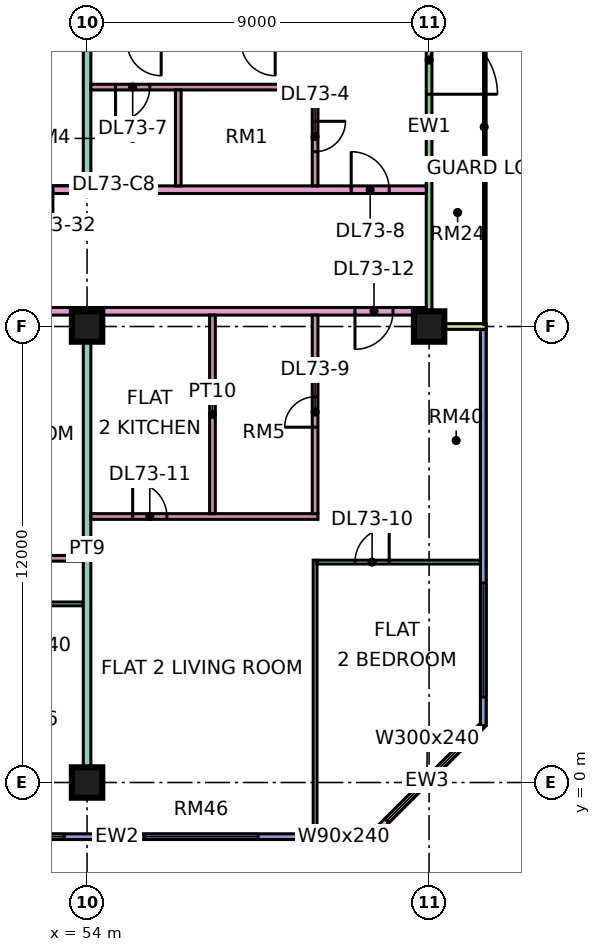
"""IFC4 building model, lengths in metres.
Left out: names, types, materials, properties, quantities, classifications, styles, units other than length and angle.
Written with IfcOpenShell. Run it as: python <this file> out.ifc"""

import sys

from ifc_helpers import new_model, si_unit, direction, frame, frame_2d, origin, origin_2d, place, context, subcontext, project, spatial, rectangle, extrude, element, fill, save


model = new_model("IFC4")
c1 = context("Model", 3, precision=1e-05, world=origin(), true_north=direction((0.0, 1.0)))
c2 = subcontext(c1, "Body", "Model", "MODEL_VIEW")
j1 = project(units=[si_unit("LENGTHUNIT", "METRE"), si_unit("PLANEANGLEUNIT", "RADIAN")], contexts=[c1])
p1 = place(None, origin())
s1 = spatial("IfcSite", under=j1, at=p1, CompositionType="ELEMENT")
p2 = place(p1, origin())
s2 = spatial("IfcBuilding", under=s1, at=p2, CompositionType="ELEMENT")
p3 = place(p2, frame((0.0, 0.0, 310.9)))
s3 = spatial("IfcBuildingStorey", under=s2, at=p3, CompositionType="ELEMENT", Elevation=310.9)
for number, where, z_axis, x_axis in (
    (1, (54.0, 0.0, 0.0), (0.0, 0.0, 1.0), (1.0, 0.0, 0.0)),
    (2, (54.0, 12.0, 0.0), (0.0, 0.0, 1.0), (1.0, 0.0, 0.0)),
    (3, (63.0, 12.0, 0.0), (0.0, 0.0, 1.0), (1.0, 0.0, 0.0)),
):
    element("IfcColumn", number, at=place(p3, frame(where, z_axis=z_axis, x_axis=x_axis)), inside=s3, PredefinedType="COLUMN", context=c2, shape_type="SweptSolid", body=[
        extrude(rectangle(XDim=0.8, YDim=0.8, at=origin_2d()), origin(), (0.0, 0.0, 1.0), 3.75),
    ])
p4 = place(p3, frame((48.075, -1.425, 0.0), z_axis=(0.0, 0.0, 1.0), x_axis=(1.0, 0.0, 0.0)))
e4 = element("IfcWall", 4, at=p4, inside=s3, PredefinedType="SOLIDWALL", context=c2, shape_type="SweptSolid", body=[
    extrude(rectangle(XDim=13.425, YDim=0.15, at=frame_2d((6.712, 0.0))), origin(), (0.0, 0.0, 1.0), 3.35),
])
p5 = place(p4, frame((0.562, 0.0, 0.45)))
e5 = element("IfcOpeningElement", 5, at=p5, cuts=e4, PredefinedType="OPENING", context=c2, shape_type="SweptSolid", body=[
    extrude(rectangle(XDim=1.8, YDim=2.4, at=frame_2d((0.9, 1.2))), frame((0.0, 0.085, 0.0), z_axis=(0.0, -1.0, 0.0), x_axis=(1.0, 0.0, 0.0)), (0.0, 0.0, 1.0), 0.17),
])
p6 = place(p4, frame((3.525, 0.0, 0.45)))
e6 = element("IfcOpeningElement", 6, at=p6, cuts=e4, PredefinedType="OPENING", context=c2, shape_type="SweptSolid", body=[
    extrude(rectangle(XDim=1.8, YDim=2.4, at=frame_2d((0.9, 1.2))), frame((0.0, 0.085, 0.0), z_axis=(0.0, -1.0, 0.0), x_axis=(1.0, 0.0, 0.0)), (0.0, 0.0, 1.0), 0.17),
])
p7 = place(p4, frame((7.425, 0.0, 0.45)))
e7 = element("IfcOpeningElement", 7, at=p7, cuts=e4, PredefinedType="OPENING", context=c2, shape_type="SweptSolid", body=[
    extrude(rectangle(XDim=3.0, YDim=2.4, at=frame_2d((1.5, 1.2))), frame((0.0, 0.085, 0.0), z_axis=(0.0, -1.0, 0.0), x_axis=(1.0, 0.0, 0.0)), (0.0, 0.0, 1.0), 0.17),
])
p8 = place(p4, frame((12.225, 0.0, 0.45)))
e8 = element("IfcOpeningElement", 8, at=p8, cuts=e4, PredefinedType="OPENING", context=c2, shape_type="SweptSolid", body=[
    extrude(rectangle(XDim=0.9, YDim=2.4, at=frame_2d((0.45, 1.2))), frame((0.0, 0.085, 0.0), z_axis=(0.0, -1.0, 0.0), x_axis=(1.0, 0.0, 0.0)), (0.0, 0.0, 1.0), 0.17),
])
p9 = place(p3, frame((61.447, -1.447, 0.0), z_axis=(0.0, 0.0, 1.0), x_axis=(0.707106781187, 0.707106781187, 0.0)))
e9 = element("IfcWall", 9, at=p9, inside=s3, PredefinedType="SOLIDWALL", context=c2, shape_type="SweptSolid", body=[
    extrude(rectangle(XDim=4.243, YDim=0.15, at=frame_2d((2.121, 0.0))), origin(), (0.0, 0.0, 1.0), 3.35),
])
p10 = place(p9, frame((0.621, 0.0, 0.45)))
e10 = element("IfcOpeningElement", 10, at=p10, cuts=e9, PredefinedType="OPENING", context=c2, shape_type="SweptSolid", body=[
    extrude(rectangle(XDim=3.0, YDim=2.4, at=frame_2d((1.5, 1.2))), frame((0.0, 0.085, 0.0), z_axis=(0.0, -1.0, 0.0), x_axis=(1.0, 0.0, 0.0)), (0.0, 0.0, 1.0), 0.17),
])
p11 = place(p3, frame((64.425, 1.5, 0.0), z_axis=(0.0, 0.0, 1.0), x_axis=(0.0, 1.0, 0.0)))
e11 = element("IfcWall", 11, at=p11, inside=s3, PredefinedType="SOLIDWALL", context=c2, shape_type="SweptSolid", body=[
    extrude(rectangle(XDim=10.425, YDim=0.15, at=frame_2d((5.212, 0.0))), origin(), (0.0, 0.0, 1.0), 3.35),
])
p12 = place(p11, frame((0.75, 0.0, 0.45)))
e12 = element("IfcOpeningElement", 12, at=p12, cuts=e11, PredefinedType="OPENING", context=c2, shape_type="SweptSolid", body=[
    extrude(rectangle(XDim=3.0, YDim=2.4, at=frame_2d((1.5, 1.2))), frame((0.0, 0.085, 0.0), z_axis=(0.0, -1.0, 0.0), x_axis=(1.0, 0.0, 0.0)), (0.0, 0.0, 1.0), 0.17),
])
p13 = place(p3, frame((63.0, 12.075, 0.0), z_axis=(0.0, 0.0, 1.0), x_axis=(0.0, 1.0, 0.0)))
e13 = element("IfcWall", 13, at=p13, inside=s3, PredefinedType="SOLIDWALL", context=c2, shape_type="SweptSolid", body=[
    extrude(rectangle(XDim=10.35, YDim=0.15, at=frame_2d((5.175, 0.0))), origin(), (0.0, 0.0, 1.0), 3.35),
])
p14 = place(p13, frame((6.038, 0.0, 0.0)))
e14 = element("IfcOpeningElement", 14, at=p14, cuts=e13, PredefinedType="OPENING", context=c2, shape_type="SweptSolid", body=[
    extrude(rectangle(XDim=1.8, YDim=2.4, at=frame_2d((0.9, 1.2))), frame((0.0, 0.085, 0.0), z_axis=(0.0, -1.0, 0.0), x_axis=(1.0, 0.0, 0.0)), (0.0, 0.0, 1.0), 0.17),
])
p15 = place(p3, frame((64.5, 12.0, 0.0), z_axis=(0.0, 0.0, 1.0), x_axis=(-1.0, 0.0, 0.0)))
e15 = element("IfcWall", 15, at=p15, inside=s3, PredefinedType="SOLIDWALL", context=c2, shape_type="SweptSolid", body=[
    extrude(rectangle(XDim=1.5, YDim=0.15, at=frame_2d((0.75, 0.0))), origin(), (0.0, 0.0, 1.0), 3.35),
])
p16 = place(p3, frame((33.05, 4.7, 0.0), z_axis=(0.0, 0.0, 1.0), x_axis=(1.0, 0.0, 0.0)))
e16 = element("IfcWall", 16, at=p16, inside=s3, PredefinedType="PARTITIONING", context=c2, shape_type="SweptSolid", body=[
    extrude(rectangle(XDim=20.85, YDim=0.1, at=frame_2d((10.425, 0.0))), origin(), (0.0, 0.0, 1.0), 3.35),
])
p17 = place(p16, frame((1.0, 0.0, 0.0)))
e17 = element("IfcOpeningElement", 17, at=p17, cuts=e16, PredefinedType="OPENING", context=c2, shape_type="SweptSolid", body=[
    extrude(rectangle(XDim=0.9, YDim=2.1, at=frame_2d((0.45, 1.05))), frame((0.0, 0.06, 0.0), z_axis=(0.0, -1.0, 0.0), x_axis=(1.0, 0.0, 0.0)), (0.0, 0.0, 1.0), 0.12),
])
p18 = place(p16, frame((4.0, 0.0, 0.0)))
e18 = element("IfcOpeningElement", 18, at=p18, cuts=e16, PredefinedType="OPENING", context=c2, shape_type="SweptSolid", body=[
    extrude(rectangle(XDim=0.9, YDim=2.1, at=frame_2d((0.45, 1.05))), frame((0.0, 0.06, 0.0), z_axis=(0.0, -1.0, 0.0), x_axis=(1.0, 0.0, 0.0)), (0.0, 0.0, 1.0), 0.12),
])
p19 = place(p16, frame((16.0, 0.0, 0.0)))
e19 = element("IfcOpeningElement", 19, at=p19, cuts=e16, PredefinedType="OPENING", context=c2, shape_type="SweptSolid", body=[
    extrude(rectangle(XDim=0.9, YDim=2.1, at=frame_2d((0.45, 1.05))), frame((0.0, 0.06, 0.0), z_axis=(0.0, -1.0, 0.0), x_axis=(1.0, 0.0, 0.0)), (0.0, 0.0, 1.0), 0.12),
])
p20 = place(p16, frame((19.0, 0.0, 0.0)))
e20 = element("IfcOpeningElement", 20, at=p20, cuts=e16, PredefinedType="OPENING", context=c2, shape_type="SweptSolid", body=[
    extrude(rectangle(XDim=0.9, YDim=2.1, at=frame_2d((0.45, 1.05))), frame((0.0, 0.06, 0.0), z_axis=(0.0, -1.0, 0.0), x_axis=(1.0, 0.0, 0.0)), (0.0, 0.0, 1.0), 0.12),
])
p21 = place(p16, frame((10.0, 0.0, 0.0)))
e21 = element("IfcOpeningElement", 21, at=p21, cuts=e16, PredefinedType="OPENING", context=c2, shape_type="SweptSolid", body=[
    extrude(rectangle(XDim=0.9, YDim=2.1, at=frame_2d((0.45, 1.05))), frame((0.0, 0.06, 0.0), z_axis=(0.0, -1.0, 0.0), x_axis=(1.0, 0.0, 0.0)), (0.0, 0.0, 1.0), 0.12),
])
p22 = place(p3, frame((40.65, 12.4, 0.0), z_axis=(0.0, 0.0, 1.0), x_axis=(1.0, 0.0, 0.0)))
e22 = element("IfcWall", 22, at=p22, inside=s3, PredefinedType="PARTITIONING", context=c2, shape_type="SweptSolid", body=[
    extrude(rectangle(XDim=22.276, YDim=0.2, at=frame_2d((11.138, 0.0))), origin(), (0.0, 0.0, 1.0), 3.35),
])
p23 = place(p22, frame((20.4, 0.0, 0.0)))
e23 = element("IfcOpeningElement", 23, at=p23, cuts=e22, PredefinedType="OPENING", context=c2, shape_type="SweptSolid", body=[
    extrude(rectangle(XDim=1.0, YDim=2.1, at=frame_2d((0.5, 1.05))), frame((0.0, 0.11, 0.0), z_axis=(0.0, -1.0, 0.0), x_axis=(1.0, 0.0, 0.0)), (0.0, 0.0, 1.0), 0.22),
])
p24 = place(p22, frame((1.05, 0.0, 0.0)))
e24 = element("IfcOpeningElement", 24, at=p24, cuts=e22, PredefinedType="OPENING", context=c2, shape_type="SweptSolid", body=[
    extrude(rectangle(XDim=1.0, YDim=2.1, at=frame_2d((0.5, 1.05))), frame((0.0, 0.11, 0.0), z_axis=(0.0, -1.0, 0.0), x_axis=(1.0, 0.0, 0.0)), (0.0, 0.0, 1.0), 0.22),
])
p25 = place(p3, frame((43.575, 5.9, 0.0), z_axis=(0.0, 0.0, 1.0), x_axis=(1.0, 0.0, 0.0)))
e25 = element("IfcWall", 25, at=p25, inside=s3, PredefinedType="PARTITIONING", context=c2, shape_type="SweptSolid", body=[
    extrude(rectangle(XDim=10.325, YDim=0.15, at=frame_2d((5.163, 0.0))), origin(), (0.0, 0.0, 1.0), 3.35),
])
p26 = place(p25, frame((1.825, 0.0, 0.0)))
e26 = element("IfcOpeningElement", 26, at=p26, cuts=e25, PredefinedType="OPENING", context=c2, shape_type="SweptSolid", body=[
    extrude(rectangle(XDim=0.8, YDim=2.1, at=frame_2d((0.4, 1.05))), frame((0.0, 0.085, 0.0), z_axis=(0.0, -1.0, 0.0), x_axis=(1.0, 0.0, 0.0)), (0.0, 0.0, 1.0), 0.17),
])
p27 = place(p25, frame((6.975, 0.0, 0.0)))
e27 = element("IfcOpeningElement", 27, at=p27, cuts=e25, PredefinedType="OPENING", context=c2, shape_type="SweptSolid", body=[
    extrude(rectangle(XDim=0.9, YDim=2.1, at=frame_2d((0.45, 1.05))), frame((0.0, 0.085, 0.0), z_axis=(0.0, -1.0, 0.0), x_axis=(1.0, 0.0, 0.0)), (0.0, 0.0, 1.0), 0.17),
])
p28 = place(p3, frame((51.225, 15.6, 0.0), z_axis=(0.0, 0.0, 1.0), x_axis=(1.0, 0.0, 0.0)))
e28 = element("IfcWall", 28, at=p28, inside=s3, PredefinedType="PARTITIONING", context=c2, shape_type="SweptSolid", body=[
    extrude(rectangle(XDim=11.701, YDim=0.2, at=frame_2d((5.851, 0.0))), origin(), (0.0, 0.0, 1.0), 3.35),
])
p29 = place(p28, frame((9.725, 0.0, 0.0)))
e29 = element("IfcOpeningElement", 29, at=p29, cuts=e28, PredefinedType="OPENING", context=c2, shape_type="SweptSolid", body=[
    extrude(rectangle(XDim=1.0, YDim=2.1, at=frame_2d((0.5, 1.05))), frame((0.0, 0.11, 0.0), z_axis=(0.0, -1.0, 0.0), x_axis=(1.0, 0.0, 0.0)), (0.0, 0.0, 1.0), 0.22),
])
p30 = place(p28, frame((0.875, 0.0, 0.0)))
e30 = element("IfcOpeningElement", 30, at=p30, cuts=e28, PredefinedType="OPENING", context=c2, shape_type="SweptSolid", body=[
    extrude(rectangle(XDim=1.0, YDim=2.1, at=frame_2d((0.5, 1.05))), frame((0.0, 0.11, 0.0), z_axis=(0.0, -1.0, 0.0), x_axis=(1.0, 0.0, 0.0)), (0.0, 0.0, 1.0), 0.22),
])
p31 = place(p3, frame((54.0, 0.0, 0.0), z_axis=(0.0, 0.0, 1.0), x_axis=(0.0, 1.0, 0.0)))
e31 = element("IfcWall", 31, at=p31, inside=s3, PredefinedType="PARTITIONING", context=c2, shape_type="SweptSolid", body=[
    extrude(rectangle(XDim=12.3, YDim=0.2, at=frame_2d((6.15, 0.0))), origin(), (0.0, 0.0, 1.0), 3.35),
])
p32 = place(p3, frame((54.0, 15.7, 0.0), z_axis=(0.0, 0.0, 1.0), x_axis=(0.0, 1.0, 0.0)))
e32 = element("IfcWall", 32, at=p32, inside=s3, PredefinedType="PARTITIONING", context=c2, shape_type="SweptSolid", body=[
    extrude(rectangle(XDim=8.3, YDim=0.2, at=frame_2d((4.15, 0.0))), origin(), (0.0, 0.0, 1.0), 3.35),
])
p33 = place(p3, frame((54.1, 7.0, 0.0), z_axis=(0.0, 0.0, 1.0), x_axis=(1.0, 0.0, 0.0)))
e33 = element("IfcWall", 33, at=p33, inside=s3, PredefinedType="PARTITIONING", context=c2, shape_type="SweptSolid", body=[
    extrude(rectangle(XDim=5.975, YDim=0.15, at=frame_2d((2.987, 0.0))), origin(), (0.0, 0.0, 1.0), 3.35),
])
p34 = place(p33, frame((1.1, 0.0, 0.0)))
e34 = element("IfcOpeningElement", 34, at=p34, cuts=e33, PredefinedType="OPENING", context=c2, shape_type="SweptSolid", body=[
    extrude(rectangle(XDim=0.9, YDim=2.1, at=frame_2d((0.45, 1.05))), frame((0.0, 0.085, 0.0), z_axis=(0.0, -1.0, 0.0), x_axis=(1.0, 0.0, 0.0)), (0.0, 0.0, 1.0), 0.17),
])
p35 = place(p3, frame((54.1, 18.3, 0.0), z_axis=(0.0, 0.0, 1.0), x_axis=(1.0, 0.0, 0.0)))
e35 = element("IfcWall", 35, at=p35, inside=s3, PredefinedType="PARTITIONING", context=c2, shape_type="SweptSolid", body=[
    extrude(rectangle(XDim=5.975, YDim=0.15, at=frame_2d((2.987, 0.0))), origin(), (0.0, 0.0, 1.0), 3.35),
])
p36 = place(p35, frame((0.65, 0.0, 0.0)))
e36 = element("IfcOpeningElement", 36, at=p36, cuts=e35, PredefinedType="OPENING", context=c2, shape_type="SweptSolid", body=[
    extrude(rectangle(XDim=0.9, YDim=2.1, at=frame_2d((0.45, 1.05))), frame((0.0, 0.085, 0.0), z_axis=(0.0, -1.0, 0.0), x_axis=(1.0, 0.0, 0.0)), (0.0, 0.0, 1.0), 0.17),
])
p37 = place(p3, frame((56.4, 15.7, 0.0), z_axis=(0.0, 0.0, 1.0), x_axis=(0.0, 1.0, 0.0)))
e37 = element("IfcWall", 37, at=p37, inside=s3, PredefinedType="PARTITIONING", context=c2, shape_type="SweptSolid", body=[
    extrude(rectangle(XDim=2.525, YDim=0.15, at=frame_2d((1.263, 0.0))), origin(), (0.0, 0.0, 1.0), 3.35),
])
p38 = place(p3, frame((57.3, 7.075, 0.0), z_axis=(0.0, 0.0, 1.0), x_axis=(0.0, 1.0, 0.0)))
e38 = element("IfcWall", 38, at=p38, inside=s3, PredefinedType="PARTITIONING", context=c2, shape_type="SweptSolid", body=[
    extrude(rectangle(XDim=5.225, YDim=0.15, at=frame_2d((2.613, 0.0))), origin(), (0.0, 0.0, 1.0), 3.35),
])
p39 = place(p3, frame((60.0, -1.35, 0.0), z_axis=(0.0, 0.0, 1.0), x_axis=(0.0, 1.0, 0.0)))
e39 = element("IfcWall", 39, at=p39, inside=s3, PredefinedType="PARTITIONING", context=c2, shape_type="SweptSolid", body=[
    extrude(rectangle(XDim=7.2, YDim=0.1, at=frame_2d((3.6, 0.0))), origin(), (0.0, 0.0, 1.0), 3.35),
])
p40 = place(p3, frame((60.0, 7.075, 0.0), z_axis=(0.0, 0.0, 1.0), x_axis=(0.0, 1.0, 0.0)))
e40 = element("IfcWall", 40, at=p40, inside=s3, PredefinedType="PARTITIONING", context=c2, shape_type="SweptSolid", body=[
    extrude(rectangle(XDim=5.225, YDim=0.15, at=frame_2d((2.613, 0.0))), origin(), (0.0, 0.0, 1.0), 3.35),
])
p41 = place(p40, frame((2.275, 0.0, 0.0)))
e41 = element("IfcOpeningElement", 41, at=p41, cuts=e40, PredefinedType="OPENING", context=c2, shape_type="SweptSolid", body=[
    extrude(rectangle(XDim=0.8, YDim=2.1, at=frame_2d((0.4, 1.05))), frame((0.0, 0.085, 0.0), z_axis=(0.0, -1.0, 0.0), x_axis=(1.0, 0.0, 0.0)), (0.0, 0.0, 1.0), 0.17),
])
p42 = place(p3, frame((60.0, 15.7, 0.0), z_axis=(0.0, 0.0, 1.0), x_axis=(0.0, 1.0, 0.0)))
e42 = element("IfcWall", 42, at=p42, inside=s3, PredefinedType="PARTITIONING", context=c2, shape_type="SweptSolid", body=[
    extrude(rectangle(XDim=2.525, YDim=0.15, at=frame_2d((1.263, 0.0))), origin(), (0.0, 0.0, 1.0), 3.35),
])
p43 = place(p42, frame((0.9, 0.0, 0.0)))
e43 = element("IfcOpeningElement", 43, at=p43, cuts=e42, PredefinedType="OPENING", context=c2, shape_type="SweptSolid", body=[
    extrude(rectangle(XDim=0.8, YDim=2.1, at=frame_2d((0.4, 1.05))), frame((0.0, 0.085, 0.0), z_axis=(0.0, -1.0, 0.0), x_axis=(1.0, 0.0, 0.0)), (0.0, 0.0, 1.0), 0.17),
])
p44 = place(p3, frame((60.05, 5.8, 0.0), z_axis=(0.0, 0.0, 1.0), x_axis=(1.0, 0.0, 0.0)))
e44 = element("IfcWall", 44, at=p44, inside=s3, PredefinedType="PARTITIONING", context=c2, shape_type="SweptSolid", body=[
    extrude(rectangle(XDim=4.3, YDim=0.1, at=frame_2d((2.15, 0.0))), origin(), (0.0, 0.0, 1.0), 3.35),
])
p45 = place(p44, frame((1.0, 0.0, 0.0)))
e45 = element("IfcOpeningElement", 45, at=p45, cuts=e44, PredefinedType="OPENING", context=c2, shape_type="SweptSolid", body=[
    extrude(rectangle(XDim=0.9, YDim=2.1, at=frame_2d((0.45, 1.05))), frame((0.0, 0.06, 0.0), z_axis=(0.0, -1.0, 0.0), x_axis=(1.0, 0.0, 0.0)), (0.0, 0.0, 1.0), 0.12),
])
p46 = place(p6, origin())
e46 = element("IfcWindow", 46, at=p46, inside=s3, PartitioningType="SINGLE_PANEL", PredefinedType="WINDOW", context=c2, shape_type="SweptSolid", body=[
    extrude(rectangle(XDim=1.8, YDim=2.4, at=frame_2d((0.9, 1.2))), frame((0.0, 0.03, 0.0), z_axis=(0.0, -1.0, 0.0), x_axis=(1.0, 0.0, 0.0)), (0.0, 0.0, 1.0), 0.06),
])
fill(e6, e46)
p47 = place(p7, origin())
e47 = element("IfcWindow", 47, at=p47, inside=s3, PartitioningType="SINGLE_PANEL", PredefinedType="WINDOW", context=c2, shape_type="SweptSolid", body=[
    extrude(rectangle(XDim=3.0, YDim=2.4, at=frame_2d((1.5, 1.2))), frame((0.0, 0.03, 0.0), z_axis=(0.0, -1.0, 0.0), x_axis=(1.0, 0.0, 0.0)), (0.0, 0.0, 1.0), 0.06),
])
fill(e7, e47)
p48 = place(p8, origin())
e48 = element("IfcWindow", 48, at=p48, inside=s3, PartitioningType="SINGLE_PANEL", PredefinedType="WINDOW", context=c2, shape_type="SweptSolid", body=[
    extrude(rectangle(XDim=0.9, YDim=2.4, at=frame_2d((0.45, 1.2))), frame((0.0, 0.03, 0.0), z_axis=(0.0, -1.0, 0.0), x_axis=(1.0, 0.0, 0.0)), (0.0, 0.0, 1.0), 0.06),
])
fill(e8, e48)
p49 = place(p10, origin())
e49 = element("IfcWindow", 49, at=p49, inside=s3, PartitioningType="SINGLE_PANEL", PredefinedType="WINDOW", context=c2, shape_type="SweptSolid", body=[
    extrude(rectangle(XDim=3.0, YDim=2.4, at=frame_2d((1.5, 1.2))), frame((0.0, 0.03, 0.0), z_axis=(0.0, -1.0, 0.0), x_axis=(1.0, 0.0, 0.0)), (0.0, 0.0, 1.0), 0.06),
])
fill(e10, e49)
p50 = place(p12, origin())
e50 = element("IfcWindow", 50, at=p50, inside=s3, PartitioningType="SINGLE_PANEL", PredefinedType="WINDOW", context=c2, shape_type="SweptSolid", body=[
    extrude(rectangle(XDim=3.0, YDim=2.4, at=frame_2d((1.5, 1.2))), frame((0.0, 0.03, 0.0), z_axis=(0.0, -1.0, 0.0), x_axis=(1.0, 0.0, 0.0)), (0.0, 0.0, 1.0), 0.06),
])
fill(e12, e50)
p51 = place(p14, frame((1.8, 0.0, 0.0), z_axis=(0.0, 0.0, 1.0), x_axis=(-1.0, 0.0, 0.0)))
e51 = element("IfcDoor", 51, at=p51, inside=s3, OperationType="DOUBLE_DOOR_SINGLE_SWING", PredefinedType="DOOR", context=c2, shape_type="SweptSolid", body=[
    extrude(rectangle(XDim=1.8, YDim=2.4, at=frame_2d((0.9, 1.2))), frame((0.0, 0.025, 0.0), z_axis=(0.0, -1.0, 0.0), x_axis=(1.0, 0.0, 0.0)), (0.0, 0.0, 1.0), 0.05),
])
fill(e14, e51)
p52 = place(p43, origin())
e52 = element("IfcDoor", 52, at=p52, inside=s3, OperationType="SINGLE_SWING_RIGHT", PredefinedType="DOOR", context=c2, shape_type="SweptSolid", body=[
    extrude(rectangle(XDim=0.8, YDim=2.1, at=frame_2d((0.4, 1.05))), frame((0.0, 0.025, 0.0), z_axis=(0.0, -1.0, 0.0), x_axis=(1.0, 0.0, 0.0)), (0.0, 0.0, 1.0), 0.05),
])
fill(e43, e52)
p53 = place(p36, frame((0.9, 0.0, 0.0), z_axis=(0.0, 0.0, 1.0), x_axis=(-1.0, 0.0, 0.0)))
e53 = element("IfcDoor", 53, at=p53, inside=s3, OperationType="SINGLE_SWING_LEFT", PredefinedType="DOOR", context=c2, shape_type="SweptSolid", body=[
    extrude(rectangle(XDim=0.9, YDim=2.1, at=frame_2d((0.45, 1.05))), frame((0.0, 0.025, 0.0), z_axis=(0.0, -1.0, 0.0), x_axis=(1.0, 0.0, 0.0)), (0.0, 0.0, 1.0), 0.05),
])
fill(e36, e53)
p54 = place(p29, origin())
e54 = element("IfcDoor", 54, at=p54, inside=s3, OperationType="SINGLE_SWING_LEFT", PredefinedType="DOOR", context=c2, shape_type="SweptSolid", body=[
    extrude(rectangle(XDim=1.0, YDim=2.1, at=frame_2d((0.5, 1.05))), frame((0.0, 0.025, 0.0), z_axis=(0.0, -1.0, 0.0), x_axis=(1.0, 0.0, 0.0)), (0.0, 0.0, 1.0), 0.05),
])
fill(e29, e54)
p55 = place(p41, origin())
e55 = element("IfcDoor", 55, at=p55, inside=s3, OperationType="SINGLE_SWING_LEFT", PredefinedType="DOOR", context=c2, shape_type="SweptSolid", body=[
    extrude(rectangle(XDim=0.8, YDim=2.1, at=frame_2d((0.4, 1.05))), frame((0.0, 0.025, 0.0), z_axis=(0.0, -1.0, 0.0), x_axis=(1.0, 0.0, 0.0)), (0.0, 0.0, 1.0), 0.05),
])
fill(e41, e55)
p56 = place(p45, frame((0.9, 0.0, 0.0), z_axis=(0.0, 0.0, 1.0), x_axis=(-1.0, 0.0, 0.0)))
e56 = element("IfcDoor", 56, at=p56, inside=s3, OperationType="SINGLE_SWING_RIGHT", PredefinedType="DOOR", context=c2, shape_type="SweptSolid", body=[
    extrude(rectangle(XDim=0.9, YDim=2.1, at=frame_2d((0.45, 1.05))), frame((0.0, 0.025, 0.0), z_axis=(0.0, -1.0, 0.0), x_axis=(1.0, 0.0, 0.0)), (0.0, 0.0, 1.0), 0.05),
])
fill(e45, e56)
p57 = place(p34, origin())
e57 = element("IfcDoor", 57, at=p57, inside=s3, OperationType="SINGLE_SWING_LEFT", PredefinedType="DOOR", context=c2, shape_type="SweptSolid", body=[
    extrude(rectangle(XDim=0.9, YDim=2.1, at=frame_2d((0.45, 1.05))), frame((0.0, 0.025, 0.0), z_axis=(0.0, -1.0, 0.0), x_axis=(1.0, 0.0, 0.0)), (0.0, 0.0, 1.0), 0.05),
])
fill(e34, e57)
p58 = place(p23, frame((1.0, 0.0, 0.0), z_axis=(0.0, 0.0, 1.0), x_axis=(-1.0, 0.0, 0.0)))
e58 = element("IfcDoor", 58, at=p58, inside=s3, OperationType="SINGLE_SWING_LEFT", PredefinedType="DOOR", context=c2, shape_type="SweptSolid", body=[
    extrude(rectangle(XDim=1.0, YDim=2.1, at=frame_2d((0.5, 1.05))), frame((0.0, 0.025, 0.0), z_axis=(0.0, -1.0, 0.0), x_axis=(1.0, 0.0, 0.0)), (0.0, 0.0, 1.0), 0.05),
])
fill(e23, e58)
p59 = place(p30, origin())
e59 = element("IfcDoor", 59, at=p59, inside=s3, OperationType="SINGLE_SWING_RIGHT", PredefinedType="DOOR", context=c2, shape_type="SweptSolid", body=[
    extrude(rectangle(XDim=1.0, YDim=2.1, at=frame_2d((0.5, 1.05))), frame((0.0, 0.025, 0.0), z_axis=(0.0, -1.0, 0.0), x_axis=(1.0, 0.0, 0.0)), (0.0, 0.0, 1.0), 0.05),
])
fill(e30, e59)
save(model, sys.argv[1])
